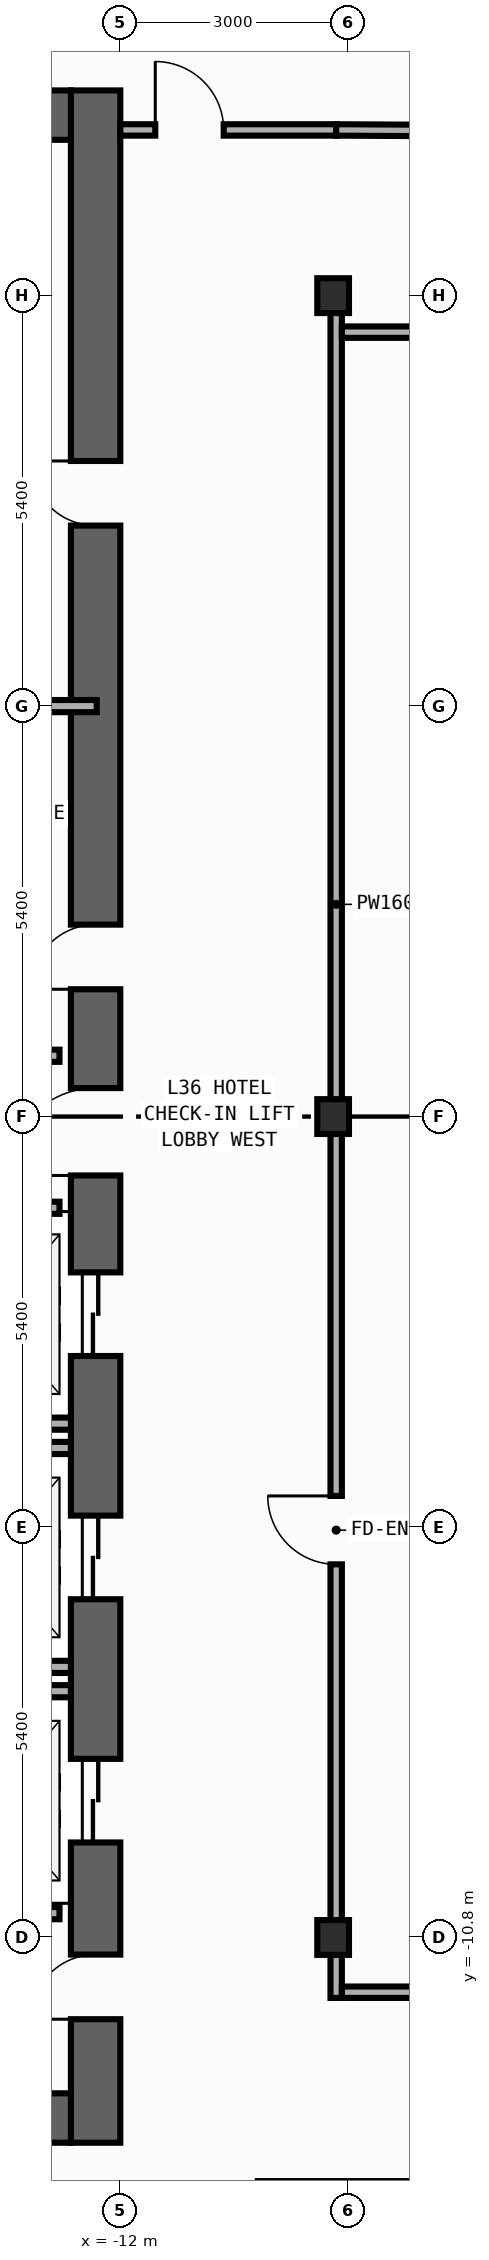
"""IFC4 building model, lengths in metres.
Left out: names, types, materials, properties, quantities, classifications, styles, units other than length and angle.
Written with IfcOpenShell. Run it as: python <this file> out.ifc"""

import sys

from ifc_helpers import new_model, si_unit, direction, frame, frame_2d, origin, origin_2d, place, context, subcontext, project, spatial, rectangle, i_section, extrude, element, fill, save


model = new_model("IFC4")
c1 = context("Model", 3, precision=1e-05, world=origin(), true_north=direction((0.0, 1.0)))
c2 = subcontext(c1, "Body", "Model", "MODEL_VIEW")
j1 = project(units=[si_unit("LENGTHUNIT", "METRE"), si_unit("PLANEANGLEUNIT", "RADIAN")], contexts=[c1])
p1 = place(None, origin())
s1 = spatial("IfcSite", under=j1, at=p1, CompositionType="ELEMENT")
p2 = place(p1, origin())
s2 = spatial("IfcBuilding", under=s1, at=p2, CompositionType="ELEMENT")
p3 = place(p2, frame((0.0, 0.0, 160.4)))
s3 = spatial("IfcBuildingStorey", under=s2, at=p3, CompositionType="ELEMENT", Elevation=160.4)
p4 = place(p3, frame((-12.325, -13.5, 0.0), z_axis=(0.0, 0.0, 1.0), x_axis=(0.0, 1.0, 0.0)))
e1 = element("IfcWall", 1, at=p4, inside=s3, PredefinedType="SHEAR", context=c2, shape_type="SweptSolid", body=[
    extrude(rectangle(XDim=27.0, YDim=0.65, at=frame_2d((13.5, 0.0))), origin(), (0.0, 0.0, 1.0), 4.34),
])
p5 = place(p4, frame((10.35, 0.0, 0.0)))
e2 = element("IfcOpeningElement", 2, at=p5, cuts=e1, PredefinedType="OPENING", context=c2, shape_type="SweptSolid", body=[
    extrude(rectangle(XDim=1.1, YDim=2.2, at=frame_2d((0.55, 1.1))), frame((0.0, 0.335, 0.0), z_axis=(0.0, -1.0, 0.0), x_axis=(1.0, 0.0, 0.0)), (0.0, 0.0, 1.0), 0.67),
])
p6 = place(p4, frame((7.15, 0.0, 0.0)))
e3 = element("IfcOpeningElement", 3, at=p6, cuts=e1, PredefinedType="OPENING", context=c2, shape_type="SweptSolid", body=[
    extrude(rectangle(XDim=1.1, YDim=2.2, at=frame_2d((0.55, 1.1))), frame((0.0, 0.335, 0.0), z_axis=(0.0, -1.0, 0.0), x_axis=(1.0, 0.0, 0.0)), (0.0, 0.0, 1.0), 0.67),
])
p7 = place(p4, frame((3.95, 0.0, 0.0)))
e4 = element("IfcOpeningElement", 4, at=p7, cuts=e1, PredefinedType="OPENING", context=c2, shape_type="SweptSolid", body=[
    extrude(rectangle(XDim=1.1, YDim=2.2, at=frame_2d((0.55, 1.1))), frame((0.0, 0.335, 0.0), z_axis=(0.0, -1.0, 0.0), x_axis=(1.0, 0.0, 0.0)), (0.0, 0.0, 1.0), 0.67),
])
p8 = place(p4, frame((15.175, 0.0, 0.0)))
e5 = element("IfcOpeningElement", 5, at=p8, cuts=e1, PredefinedType="OPENING", context=c2, shape_type="SweptSolid", body=[
    extrude(rectangle(XDim=0.85, YDim=2.1, at=frame_2d((0.425, 1.05))), frame((0.0, 0.335, 0.0), z_axis=(0.0, -1.0, 0.0), x_axis=(1.0, 0.0, 0.0)), (0.0, 0.0, 1.0), 0.67),
])
p9 = place(p4, frame((21.275, 0.0, 0.0)))
e6 = element("IfcOpeningElement", 6, at=p9, cuts=e1, PredefinedType="OPENING", context=c2, shape_type="SweptSolid", body=[
    extrude(rectangle(XDim=0.85, YDim=2.1, at=frame_2d((0.425, 1.05))), frame((0.0, 0.335, 0.0), z_axis=(0.0, -1.0, 0.0), x_axis=(1.0, 0.0, 0.0)), (0.0, 0.0, 1.0), 0.67),
])
p10 = place(p4, frame((12.725, 0.0, 0.0)))
e7 = element("IfcOpeningElement", 7, at=p10, cuts=e1, PredefinedType="OPENING", context=c2, shape_type="SweptSolid", body=[
    extrude(rectangle(XDim=1.15, YDim=2.2, at=frame_2d((0.575, 1.1))), frame((0.0, 0.335, 0.0), z_axis=(0.0, -1.0, 0.0), x_axis=(1.0, 0.0, 0.0)), (0.0, 0.0, 1.0), 0.67),
])
p11 = place(p4, frame((1.625, 0.0, 0.0)))
e8 = element("IfcOpeningElement", 8, at=p11, cuts=e1, PredefinedType="OPENING", context=c2, shape_type="SweptSolid", body=[
    extrude(rectangle(XDim=0.85, YDim=2.1, at=frame_2d((0.425, 1.05))), frame((0.0, 0.335, 0.0), z_axis=(0.0, -1.0, 0.0), x_axis=(1.0, 0.0, 0.0)), (0.0, 0.0, 1.0), 0.67),
])
for number, where, z_axis, x_axis in (
    (9, (-19.75, -13.175, 0.0), (0.0, 0.0, 1.0), (1.0, 0.0, 0.0)),
    (10, (-19.75, 13.175, 0.0), (0.0, 0.0, 1.0), (1.0, 0.0, 0.0)),
):
    element("IfcWall", number, at=place(p3, frame(where, z_axis=z_axis, x_axis=x_axis)), inside=s3, PredefinedType="SHEAR", context=c2, shape_type="SweptSolid", body=[
        extrude(rectangle(XDim=7.1, YDim=0.65, at=frame_2d((3.55, 0.0))), origin(), (0.0, 0.0, 1.0), 4.34),
    ])
for number, where, z_axis, x_axis in (
    (11, (-9.2, -10.8, 0.0), (0.0, 0.0, 1.0), (1.0, 0.0, 0.0)),
    (12, (-9.2, 0.0, 0.0), (0.0, 0.0, 1.0), (1.0, 0.0, 0.0)),
    (13, (-9.2, 10.8, 0.0), (0.0, 0.0, 1.0), (1.0, 0.0, 0.0)),
):
    element("IfcColumn", number, at=place(p3, frame(where, z_axis=z_axis, x_axis=x_axis)), inside=s3, PredefinedType="COLUMN", context=c2, shape_type="SweptSolid", body=[
        extrude(i_section(OverallWidth=0.417, OverallDepth=0.458, WebThickness=0.03, FlangeThickness=0.05, FilletRadius=0.022, at=origin_2d()), origin(), (0.0, 0.0, 1.0), 4.6),
    ])
for number, where, z_axis, x_axis in (
    (14, (-14.99, -4.04, 0.0), (0.0, 0.0, 1.0), (1.0, 0.0, 0.0)),
    (15, (-14.99, -7.24, 0.0), (0.0, 0.0, 1.0), (1.0, 0.0, 0.0)),
    (16, (-14.99, -4.36, 0.0), (0.0, 0.0, 1.0), (1.0, 0.0, 0.0)),
    (17, (-14.99, -7.56, 0.0), (0.0, 0.0, 1.0), (1.0, 0.0, 0.0)),
):
    element("IfcWall", number, at=place(p3, frame(where, z_axis=z_axis, x_axis=x_axis)), inside=s3, PredefinedType="STANDARD", context=c2, shape_type="SweptSolid", body=[
        extrude(rectangle(XDim=2.34, YDim=0.16, at=frame_2d((1.17, 0.0))), origin(), (0.0, 0.0, 1.0), 4.34),
    ])
for number, where, z_axis, x_axis in (
    (18, (-15.4, 0.8, 0.0), (0.0, 0.0, 1.0), (1.0, 0.0, 0.0)),
    (19, (-15.4, -1.2, 0.0), (0.0, 0.0, 1.0), (1.0, 0.0, 0.0)),
    (20, (-15.4, -10.48, 0.0), (0.0, 0.0, 1.0), (1.0, 0.0, 0.0)),
):
    element("IfcWall", number, at=place(p3, frame(where, z_axis=z_axis, x_axis=x_axis)), inside=s3, PredefinedType="STANDARD", context=c2, shape_type="SweptSolid", body=[
        extrude(rectangle(XDim=2.6, YDim=0.16, at=frame_2d((1.3, 0.0))), origin(), (0.0, 0.0, 1.0), 4.34),
    ])
p12 = place(p3, frame((-15.375, 5.4, 0.0), z_axis=(0.0, 0.0, 1.0), x_axis=(1.0, 0.0, 0.0)))
e21 = element("IfcWall", 21, at=p12, inside=s3, PredefinedType="PARTITIONING", context=c2, shape_type="SweptSolid", body=[
    extrude(rectangle(XDim=3.065, YDim=0.16, at=frame_2d((1.532, 0.0))), origin(), (0.0, 0.0, 1.0), 4.34),
])
p13 = place(p3, frame((-9.16, -11.595, 0.0), z_axis=(0.0, 0.0, 1.0), x_axis=(0.0, 1.0, 0.0)))
e22 = element("IfcWall", 22, at=p13, inside=s3, PredefinedType="PARTITIONING", context=c2, shape_type="SweptSolid", body=[
    extrude(rectangle(XDim=22.17, YDim=0.15, at=frame_2d((11.085, 0.0))), origin(), (0.0, 0.0, 1.0), 3.752),
])
p14 = place(p13, frame((5.704, 0.0, 0.0)))
e23 = element("IfcOpeningElement", 23, at=p14, cuts=e22, PredefinedType="OPENING", context=c2, shape_type="SweptSolid", body=[
    extrude(rectangle(XDim=0.9, YDim=2.15, at=frame_2d((0.45, 1.075))), frame((0.0, 0.085, 0.0), z_axis=(0.0, -1.0, 0.0), x_axis=(1.0, 0.0, 0.0)), (0.0, 0.0, 1.0), 0.17),
])
p15 = place(p3, frame((-12.0, 12.98, 0.0), z_axis=(0.0, 0.0, 1.0), x_axis=(1.0, 0.0, 0.0)))
e24 = element("IfcWall", 24, at=p15, inside=s3, PredefinedType="PARTITIONING", context=c2, shape_type="SweptSolid", body=[
    extrude(rectangle(XDim=2.84, YDim=0.15, at=frame_2d((1.42, 0.0))), origin(), (0.0, 0.0, 1.0), 4.34),
])
p16 = place(p15, frame((0.46, 0.0, 0.0)))
e25 = element("IfcOpeningElement", 25, at=p16, cuts=e24, PredefinedType="OPENING", context=c2, shape_type="SweptSolid", body=[
    extrude(rectangle(XDim=0.9, YDim=2.15, at=frame_2d((0.45, 1.075))), frame((0.0, 0.085, 0.0), z_axis=(0.0, -1.0, 0.0), x_axis=(1.0, 0.0, 0.0)), (0.0, 0.0, 1.0), 0.17),
])
p17 = place(p3, frame((-9.085, -11.52, 0.0), z_axis=(0.0, 0.0, 1.0), x_axis=(1.0, 0.0, 0.0)))
e26 = element("IfcWall", 26, at=p17, inside=s3, PredefinedType="PARTITIONING", context=c2, shape_type="SweptSolid", body=[
    extrude(rectangle(XDim=18.17, YDim=0.15, at=frame_2d((9.085, 0.0))), origin(), (0.0, 0.0, 1.0), 4.34),
])
p18 = place(p17, frame((6.516, 0.0, 0.0)))
e27 = element("IfcOpeningElement", 27, at=p18, cuts=e26, PredefinedType="OPENING", context=c2, shape_type="SweptSolid", body=[
    extrude(rectangle(XDim=0.9, YDim=2.15, at=frame_2d((0.45, 1.075))), frame((0.0, 0.085, 0.0), z_axis=(0.0, -1.0, 0.0), x_axis=(1.0, 0.0, 0.0)), (0.0, 0.0, 1.0), 0.17),
])
p19 = place(p3, frame((-9.085, 10.32, 0.0), z_axis=(0.0, 0.0, 1.0), x_axis=(1.0, 0.0, 0.0)))
e28 = element("IfcWall", 28, at=p19, inside=s3, PredefinedType="PARTITIONING", context=c2, shape_type="SweptSolid", body=[
    extrude(rectangle(XDim=18.17, YDim=0.15, at=frame_2d((9.085, 0.0))), origin(), (0.0, 0.0, 1.0), 4.34),
])
p20 = place(p19, frame((7.525, 0.0, 0.0)))
e29 = element("IfcOpeningElement", 29, at=p20, cuts=e28, PredefinedType="OPENING", context=c2, shape_type="SweptSolid", body=[
    extrude(rectangle(XDim=0.9, YDim=2.15, at=frame_2d((0.45, 1.075))), frame((0.0, 0.085, 0.0), z_axis=(0.0, -1.0, 0.0), x_axis=(1.0, 0.0, 0.0)), (0.0, 0.0, 1.0), 0.17),
])
p21 = place(p3, frame((-9.16, 12.98, 0.0), z_axis=(0.0, 0.0, 1.0), x_axis=(0.999985073242, -0.005463816733, 0.0)))
e30 = element("IfcWall", 30, at=p21, inside=s3, PredefinedType="PARTITIONING", context=c2, shape_type="SweptSolid", body=[
    extrude(rectangle(XDim=18.32, YDim=0.15, at=frame_2d((9.16, 0.0))), origin(), (0.0, 0.0, 1.0), 4.34),
])
p22 = place(p21, frame((10.924, 0.0, 0.0)))
e31 = element("IfcOpeningElement", 31, at=p22, cuts=e30, PredefinedType="OPENING", context=c2, shape_type="SweptSolid", body=[
    extrude(rectangle(XDim=0.9, YDim=2.15, at=frame_2d((0.45, 1.075))), frame((0.0, 0.085, 0.0), z_axis=(0.0, -1.0, 0.0), x_axis=(1.0, 0.0, 0.0)), (0.0, 0.0, 1.0), 0.17),
])
p23 = place(p5, origin())
e32 = element("IfcDoor", 32, at=p23, inside=s3, OperationType="DOUBLE_DOOR_SLIDING", PredefinedType="DOOR", context=c2, shape_type="SweptSolid", body=[
    extrude(rectangle(XDim=1.1, YDim=2.2, at=frame_2d((0.55, 1.1))), frame((0.0, 0.025, 0.0), z_axis=(0.0, -1.0, 0.0), x_axis=(1.0, 0.0, 0.0)), (0.0, 0.0, 1.0), 0.05),
])
fill(e2, e32)
p24 = place(p6, origin())
e33 = element("IfcDoor", 33, at=p24, inside=s3, OperationType="DOUBLE_DOOR_SLIDING", PredefinedType="DOOR", context=c2, shape_type="SweptSolid", body=[
    extrude(rectangle(XDim=1.1, YDim=2.2, at=frame_2d((0.55, 1.1))), frame((0.0, 0.025, 0.0), z_axis=(0.0, -1.0, 0.0), x_axis=(1.0, 0.0, 0.0)), (0.0, 0.0, 1.0), 0.05),
])
fill(e3, e33)
p25 = place(p7, origin())
e34 = element("IfcDoor", 34, at=p25, inside=s3, OperationType="DOUBLE_DOOR_SLIDING", PredefinedType="DOOR", context=c2, shape_type="SweptSolid", body=[
    extrude(rectangle(XDim=1.1, YDim=2.2, at=frame_2d((0.55, 1.1))), frame((0.0, 0.025, 0.0), z_axis=(0.0, -1.0, 0.0), x_axis=(1.0, 0.0, 0.0)), (0.0, 0.0, 1.0), 0.05),
])
fill(e4, e34)
p26 = place(p8, origin())
e35 = element("IfcDoor", 35, at=p26, inside=s3, OperationType="SINGLE_SWING_LEFT", PredefinedType="DOOR", context=c2, shape_type="SweptSolid", body=[
    extrude(rectangle(XDim=0.85, YDim=2.1, at=frame_2d((0.425, 1.05))), frame((0.0, 0.025, 0.0), z_axis=(0.0, -1.0, 0.0), x_axis=(1.0, 0.0, 0.0)), (0.0, 0.0, 1.0), 0.05),
])
fill(e5, e35)
p27 = place(p9, origin())
e36 = element("IfcDoor", 36, at=p27, inside=s3, OperationType="SINGLE_SWING_RIGHT", PredefinedType="DOOR", context=c2, shape_type="SweptSolid", body=[
    extrude(rectangle(XDim=0.85, YDim=2.1, at=frame_2d((0.425, 1.05))), frame((0.0, 0.025, 0.0), z_axis=(0.0, -1.0, 0.0), x_axis=(1.0, 0.0, 0.0)), (0.0, 0.0, 1.0), 0.05),
])
fill(e6, e36)
p28 = place(p10, origin())
e37 = element("IfcDoor", 37, at=p28, inside=s3, OperationType="SINGLE_SWING_LEFT", PredefinedType="DOOR", context=c2, shape_type="SweptSolid", body=[
    extrude(rectangle(XDim=1.15, YDim=2.2, at=frame_2d((0.575, 1.1))), frame((0.0, 0.025, 0.0), z_axis=(0.0, -1.0, 0.0), x_axis=(1.0, 0.0, 0.0)), (0.0, 0.0, 1.0), 0.05),
])
fill(e7, e37)
p29 = place(p11, origin())
e38 = element("IfcDoor", 38, at=p29, inside=s3, OperationType="SINGLE_SWING_LEFT", PredefinedType="DOOR", context=c2, shape_type="SweptSolid", body=[
    extrude(rectangle(XDim=0.85, YDim=2.1, at=frame_2d((0.425, 1.05))), frame((0.0, 0.025, 0.0), z_axis=(0.0, -1.0, 0.0), x_axis=(1.0, 0.0, 0.0)), (0.0, 0.0, 1.0), 0.05),
])
fill(e8, e38)
p30 = place(p14, origin())
e39 = element("IfcDoor", 39, at=p30, inside=s3, OperationType="SINGLE_SWING_RIGHT", PredefinedType="DOOR", context=c2, shape_type="SweptSolid", body=[
    extrude(rectangle(XDim=0.9, YDim=2.15, at=frame_2d((0.45, 1.075))), frame((0.0, 0.025, 0.0), z_axis=(0.0, -1.0, 0.0), x_axis=(1.0, 0.0, 0.0)), (0.0, 0.0, 1.0), 0.05),
])
fill(e23, e39)
p31 = place(p16, origin())
e40 = element("IfcDoor", 40, at=p31, inside=s3, OperationType="SINGLE_SWING_LEFT", PredefinedType="DOOR", context=c2, shape_type="SweptSolid", body=[
    extrude(rectangle(XDim=0.9, YDim=2.15, at=frame_2d((0.45, 1.075))), frame((0.0, 0.025, 0.0), z_axis=(0.0, -1.0, 0.0), x_axis=(1.0, 0.0, 0.0)), (0.0, 0.0, 1.0), 0.05),
])
fill(e25, e40)
save(model, sys.argv[1])
